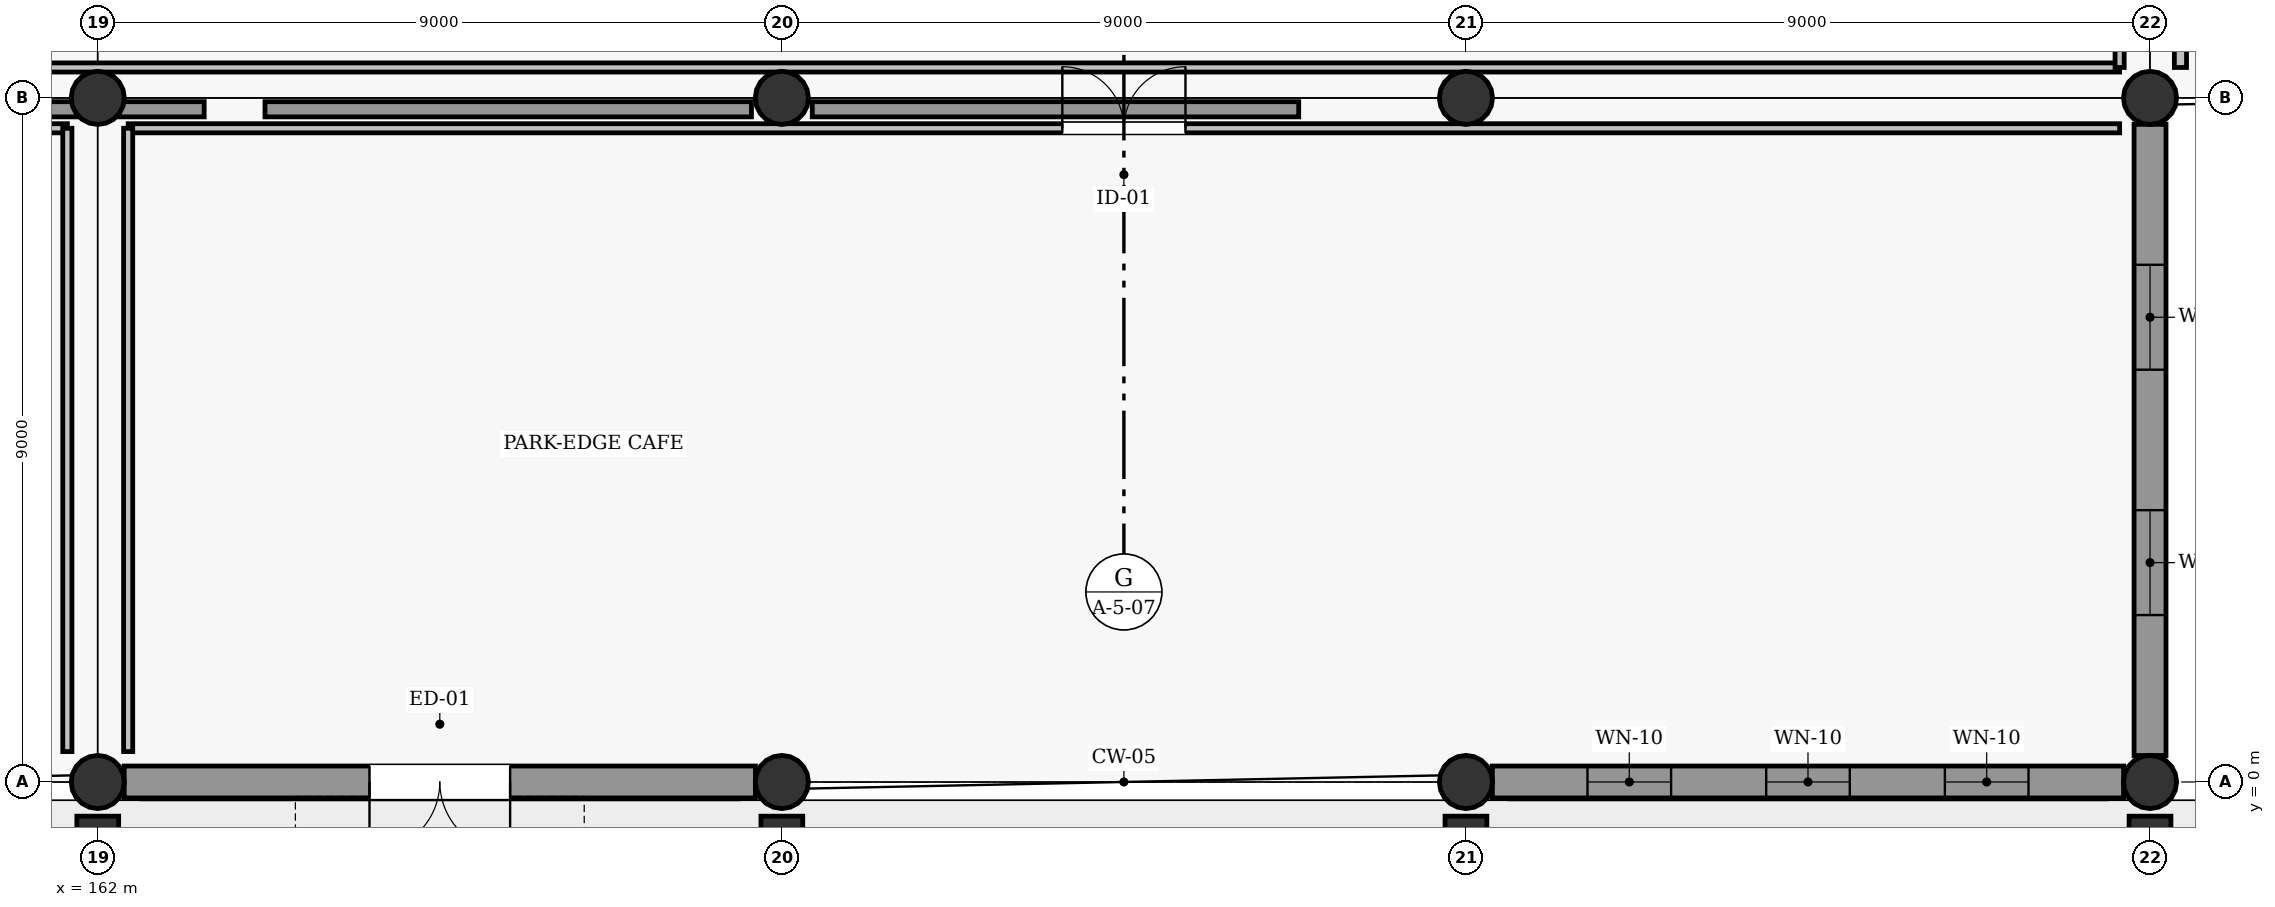
"""IFC4 building model, lengths in metres.
Left out: names, types, materials, properties, quantities, classifications, styles, units other than length and angle.
Written with IfcOpenShell. Run it as: python <this file> out.ifc"""

import sys

from ifc_helpers import new_model, si_unit, direction, frame, frame_2d, origin, origin_2d, place, context, subcontext, project, spatial, rectangle, circle, extrude, element, fill, save


model = new_model("IFC4")
c1 = context("Model", 3, precision=1e-05, world=origin(), true_north=direction((0.0, 1.0)))
c2 = subcontext(c1, "Body", "Model", "MODEL_VIEW")
j1 = project(units=[si_unit("LENGTHUNIT", "METRE"), si_unit("PLANEANGLEUNIT", "RADIAN")], contexts=[c1])
p1 = place(None, origin())
s1 = spatial("IfcSite", under=j1, at=p1, CompositionType="ELEMENT")
p2 = place(p1, origin())
s2 = spatial("IfcBuilding", under=s1, at=p2, CompositionType="ELEMENT")
p3 = place(p2, origin())
s3 = spatial("IfcBuildingStorey", under=s2, at=p3, CompositionType="ELEMENT", Elevation=0.0)
for number, where, z_axis, x_axis in (
    (1, (162.0, 0.0, 0.0), (0.0, 0.0, 1.0), (1.0, 0.0, 0.0)),
    (2, (162.0, 9.0, 0.0), (0.0, 0.0, 1.0), (1.0, 0.0, 0.0)),
    (3, (171.0, 0.0, 0.0), (0.0, 0.0, 1.0), (1.0, 0.0, 0.0)),
    (4, (171.0, 9.0, 0.0), (0.0, 0.0, 1.0), (1.0, 0.0, 0.0)),
    (5, (180.0, 0.0, 0.0), (0.0, 0.0, 1.0), (1.0, 0.0, 0.0)),
    (6, (180.0, 9.0, 0.0), (0.0, 0.0, 1.0), (1.0, 0.0, 0.0)),
    (7, (189.0, 0.0, 0.0), (0.0, 0.0, 1.0), (1.0, 0.0, 0.0)),
    (8, (189.0, 9.0, 0.0), (0.0, 0.0, 1.0), (1.0, 0.0, 0.0)),
):
    element("IfcColumn", number, at=place(p3, frame(where, z_axis=z_axis, x_axis=x_axis)), inside=s3, PredefinedType="COLUMN", context=c2, shape_type="SweptSolid", body=[
        extrude(circle(Radius=0.35, at=origin_2d()), origin(), (0.0, 0.0, 1.0), 4.8),
    ])
for number, where, z_axis, x_axis in (
    (9, (162.0, -0.85, 0.0), (0.0, 0.0, 1.0), (1.0, 0.0, 0.0)),
    (10, (171.0, -0.85, 0.0), (0.0, 0.0, 1.0), (1.0, 0.0, 0.0)),
    (11, (180.0, -0.85, 0.0), (0.0, 0.0, 1.0), (1.0, 0.0, 0.0)),
    (12, (189.0, -0.85, 0.0), (0.0, 0.0, 1.0), (1.0, 0.0, 0.0)),
):
    element("IfcColumn", number, at=place(p3, frame(where, z_axis=z_axis, x_axis=x_axis)), inside=s3, PredefinedType="PILASTER", context=c2, shape_type="SweptSolid", body=[
        extrude(rectangle(XDim=0.55, YDim=0.8, at=origin_2d()), origin(), (0.0, 0.0, 1.0), 4.8),
    ])
p4 = place(p3, frame((162.348, 0.0, 0.0), z_axis=(0.0, 0.0, 1.0), x_axis=(1.0, 0.0, 0.0)))
e13 = element("IfcWall", 13, at=p4, inside=s3, PredefinedType="SOLIDWALL", context=c2, shape_type="SweptSolid", body=[
    extrude(rectangle(XDim=8.304, YDim=0.42, at=frame_2d((4.152, 0.0))), origin(), (0.0, 0.0, 1.0), 3.962),
])
p5 = place(p4, frame((3.227, 0.0, 0.0)))
e14 = element("IfcOpeningElement", 14, at=p5, cuts=e13, PredefinedType="OPENING", context=c2, shape_type="SweptSolid", body=[
    extrude(rectangle(XDim=1.85, YDim=2.35, at=frame_2d((0.925, 1.175))), frame((0.0, 0.22, 0.0), z_axis=(0.0, -1.0, 0.0), x_axis=(1.0, 0.0, 0.0)), (0.0, 0.0, 1.0), 0.44),
])
p6 = place(p3, frame((180.348, 0.0, 0.0), z_axis=(0.0, 0.0, 1.0), x_axis=(1.0, 0.0, 0.0)))
e15 = element("IfcWall", 15, at=p6, inside=s3, PredefinedType="SOLIDWALL", context=c2, shape_type="SweptSolid", body=[
    extrude(rectangle(XDim=8.304, YDim=0.42, at=frame_2d((4.152, 0.0))), origin(), (0.0, 0.0, 1.0), 3.962),
])
p7 = place(p6, frame((1.251, 0.0, 0.85)))
e16 = element("IfcOpeningElement", 16, at=p7, cuts=e15, PredefinedType="OPENING", context=c2, shape_type="SweptSolid", body=[
    extrude(rectangle(XDim=1.1, YDim=2.1, at=frame_2d((0.55, 1.05))), frame((0.0, 0.22, 0.0), z_axis=(0.0, -1.0, 0.0), x_axis=(1.0, 0.0, 0.0)), (0.0, 0.0, 1.0), 0.44),
])
p8 = place(p6, frame((3.602, 0.0, 0.85)))
e17 = element("IfcOpeningElement", 17, at=p8, cuts=e15, PredefinedType="OPENING", context=c2, shape_type="SweptSolid", body=[
    extrude(rectangle(XDim=1.1, YDim=2.1, at=frame_2d((0.55, 1.05))), frame((0.0, 0.22, 0.0), z_axis=(0.0, -1.0, 0.0), x_axis=(1.0, 0.0, 0.0)), (0.0, 0.0, 1.0), 0.44),
])
p9 = place(p6, frame((5.953, 0.0, 0.85)))
e18 = element("IfcOpeningElement", 18, at=p9, cuts=e15, PredefinedType="OPENING", context=c2, shape_type="SweptSolid", body=[
    extrude(rectangle(XDim=1.1, YDim=2.1, at=frame_2d((0.55, 1.05))), frame((0.0, 0.22, 0.0), z_axis=(0.0, -1.0, 0.0), x_axis=(1.0, 0.0, 0.0)), (0.0, 0.0, 1.0), 0.44),
])
p10 = place(p3, frame((189.0, 0.348, 0.0), z_axis=(0.0, 0.0, 1.0), x_axis=(0.0, 1.0, 0.0)))
e19 = element("IfcWall", 19, at=p10, inside=s3, PredefinedType="SOLIDWALL", context=c2, shape_type="SweptSolid", body=[
    extrude(rectangle(XDim=8.304, YDim=0.42, at=frame_2d((4.152, 0.0))), origin(), (0.0, 0.0, 1.0), 4.062),
])
p11 = place(p10, frame((1.848, 0.0, 0.85)))
e20 = element("IfcOpeningElement", 20, at=p11, cuts=e19, PredefinedType="OPENING", context=c2, shape_type="SweptSolid", body=[
    extrude(rectangle(XDim=1.38, YDim=1.52, at=frame_2d((0.69, 0.76))), frame((0.0, 0.22, 0.0), z_axis=(0.0, -1.0, 0.0), x_axis=(1.0, 0.0, 0.0)), (0.0, 0.0, 1.0), 0.44),
])
p12 = place(p10, frame((5.076, 0.0, 0.85)))
e21 = element("IfcOpeningElement", 21, at=p12, cuts=e19, PredefinedType="OPENING", context=c2, shape_type="SweptSolid", body=[
    extrude(rectangle(XDim=1.38, YDim=1.52, at=frame_2d((0.69, 0.76))), frame((0.0, 0.22, 0.0), z_axis=(0.0, -1.0, 0.0), x_axis=(1.0, 0.0, 0.0)), (0.0, 0.0, 1.0), 0.44),
])
p13 = place(p3, frame((157.0, 8.85, 0.0), z_axis=(0.0, 0.0, 1.0), x_axis=(1.0, 0.0, 0.0)))
e22 = element("IfcWall", 22, at=p13, inside=s3, PredefinedType="PARAPET", context=c2, shape_type="SweptSolid", body=[
    extrude(rectangle(XDim=6.4, YDim=0.2, at=frame_2d((3.2, 0.0))), origin(), (0.0, 0.0, 1.0), 0.85),
])
for number, where, z_axis, x_axis in (
    (23, (164.2, 8.85, 0.0), (0.0, 0.0, 1.0), (1.0, 0.0, 0.0)),
    (24, (171.4, 8.85, 0.0), (0.0, 0.0, 1.0), (1.0, 0.0, 0.0)),
):
    element("IfcWall", number, at=place(p3, frame(where, z_axis=z_axis, x_axis=x_axis)), inside=s3, PredefinedType="PARAPET", context=c2, shape_type="SweptSolid", body=[
        extrude(rectangle(XDim=6.4, YDim=0.2, at=frame_2d((3.2, 0.0))), origin(), (0.0, 0.0, 1.0), 0.85),
    ])
p14 = place(p3, frame((135.4, 8.6, 0.0), z_axis=(0.0, 0.0, 1.0), x_axis=(1.0, 0.0, 0.0)))
e25 = element("IfcWall", 25, at=p14, inside=s3, PredefinedType="PARTITIONING", context=c2, shape_type="SweptSolid", body=[
    extrude(rectangle(XDim=26.2, YDim=0.12, at=frame_2d((13.1, 0.0))), origin(), (0.0, 0.0, 1.0), 3.885),
])
p15 = place(p14, frame((12.23, 0.0, 0.0)))
e26 = element("IfcOpeningElement", 26, at=p15, cuts=e25, PredefinedType="OPENING", context=c2, shape_type="SweptSolid", body=[
    extrude(rectangle(XDim=1.74, YDim=2.18, at=frame_2d((0.87, 1.09))), frame((0.0, 0.07, 0.0), z_axis=(0.0, -1.0, 0.0), x_axis=(1.0, 0.0, 0.0)), (0.0, 0.0, 1.0), 0.14),
])
p16 = place(p3, frame((161.6, 0.4, 0.0), z_axis=(0.0, 0.0, 1.0), x_axis=(0.0, 1.0, 0.0)))
e27 = element("IfcWall", 27, at=p16, inside=s3, PredefinedType="PARTITIONING", context=c2, shape_type="SweptSolid", body=[
    extrude(rectangle(XDim=8.2, YDim=0.12, at=frame_2d((4.1, 0.0))), origin(), (0.0, 0.0, 1.0), 4.55),
])
p17 = place(p3, frame((162.4, 8.6, 0.0), z_axis=(0.0, 0.0, 1.0), x_axis=(1.0, 0.0, 0.0)))
e28 = element("IfcWall", 28, at=p17, inside=s3, PredefinedType="PARTITIONING", context=c2, shape_type="SweptSolid", body=[
    extrude(rectangle(XDim=26.2, YDim=0.12, at=frame_2d((13.1, 0.0))), origin(), (0.0, 0.0, 1.0), 3.885),
])
p18 = place(p17, frame((12.29, 0.0, 0.0)))
e29 = element("IfcOpeningElement", 29, at=p18, cuts=e28, PredefinedType="OPENING", context=c2, shape_type="SweptSolid", body=[
    extrude(rectangle(XDim=1.62, YDim=2.14, at=frame_2d((0.81, 1.07))), frame((0.0, 0.07, 0.0), z_axis=(0.0, -1.0, 0.0), x_axis=(1.0, 0.0, 0.0)), (0.0, 0.0, 1.0), 0.14),
])
p19 = place(p3, frame((162.4, 0.4, 0.0), z_axis=(0.0, 0.0, 1.0), x_axis=(0.0, 1.0, 0.0)))
e30 = element("IfcWall", 30, at=p19, inside=s3, PredefinedType="PARTITIONING", context=c2, shape_type="SweptSolid", body=[
    extrude(rectangle(XDim=8.2, YDim=0.12, at=frame_2d((4.1, 0.0))), origin(), (0.0, 0.0, 1.0), 4.55),
])
p20 = place(p3, frame((144.4, 9.4, 0.0), z_axis=(0.0, 0.0, 1.0), x_axis=(1.0, 0.0, 0.0)))
e31 = element("IfcWall", 31, at=p20, inside=s3, PredefinedType="PARTITIONING", context=c2, shape_type="SweptSolid", body=[
    extrude(rectangle(XDim=44.2, YDim=0.12, at=frame_2d((22.1, 0.0))), origin(), (0.0, 0.0, 1.0), 3.885),
])
p21 = place(p3, frame((188.6, 9.4, 0.0), z_axis=(0.0, 0.0, 1.0), x_axis=(0.0, 1.0, 0.0)))
e32 = element("IfcWall", 32, at=p21, inside=s3, PredefinedType="PARTITIONING", context=c2, shape_type="SweptSolid", body=[
    extrude(rectangle(XDim=8.4, YDim=0.12, at=frame_2d((4.2, 0.0))), origin(), (0.0, 0.0, 1.0), 3.785),
])
p22 = place(p3, frame((189.4, 9.4, 0.0), z_axis=(0.0, 0.0, 1.0), x_axis=(0.0, 1.0, 0.0)))
e33 = element("IfcWall", 33, at=p22, inside=s3, PredefinedType="PARTITIONING", context=c2, shape_type="SweptSolid", body=[
    extrude(rectangle(XDim=8.4, YDim=0.16, at=frame_2d((4.2, 0.0))), origin(), (0.0, 0.0, 1.0), 3.785),
])
p23 = place(p5, frame((1.85, 0.0, 0.0), z_axis=(0.0, 0.0, 1.0), x_axis=(-1.0, 0.0, 0.0)))
e34 = element("IfcDoor", 34, at=p23, inside=s3, OperationType="DOUBLE_SWING_LEFT", PredefinedType="DOOR", context=c2, shape_type="SweptSolid", body=[
    extrude(rectangle(XDim=1.85, YDim=2.35, at=frame_2d((0.925, 1.175))), frame((0.0, 0.025, 0.0), z_axis=(0.0, -1.0, 0.0), x_axis=(1.0, 0.0, 0.0)), (0.0, 0.0, 1.0), 0.05),
])
fill(e14, e34)
p24 = place(p7, origin())
e35 = element("IfcWindow", 35, at=p24, inside=s3, PartitioningType="SINGLE_PANEL", PredefinedType="WINDOW", context=c2, shape_type="SweptSolid", body=[
    extrude(rectangle(XDim=1.1, YDim=2.1, at=frame_2d((0.55, 1.05))), frame((0.0, 0.03, 0.0), z_axis=(0.0, -1.0, 0.0), x_axis=(1.0, 0.0, 0.0)), (0.0, 0.0, 1.0), 0.06),
])
fill(e16, e35)
p25 = place(p8, origin())
e36 = element("IfcWindow", 36, at=p25, inside=s3, PartitioningType="SINGLE_PANEL", PredefinedType="WINDOW", context=c2, shape_type="SweptSolid", body=[
    extrude(rectangle(XDim=1.1, YDim=2.1, at=frame_2d((0.55, 1.05))), frame((0.0, 0.03, 0.0), z_axis=(0.0, -1.0, 0.0), x_axis=(1.0, 0.0, 0.0)), (0.0, 0.0, 1.0), 0.06),
])
fill(e17, e36)
p26 = place(p9, origin())
e37 = element("IfcWindow", 37, at=p26, inside=s3, PartitioningType="SINGLE_PANEL", PredefinedType="WINDOW", context=c2, shape_type="SweptSolid", body=[
    extrude(rectangle(XDim=1.1, YDim=2.1, at=frame_2d((0.55, 1.05))), frame((0.0, 0.03, 0.0), z_axis=(0.0, -1.0, 0.0), x_axis=(1.0, 0.0, 0.0)), (0.0, 0.0, 1.0), 0.06),
])
fill(e18, e37)
p27 = place(p11, origin())
e38 = element("IfcWindow", 38, at=p27, inside=s3, PartitioningType="SINGLE_PANEL", PredefinedType="WINDOW", context=c2, shape_type="SweptSolid", body=[
    extrude(rectangle(XDim=1.38, YDim=1.52, at=frame_2d((0.69, 0.76))), frame((0.0, 0.03, 0.0), z_axis=(0.0, -1.0, 0.0), x_axis=(1.0, 0.0, 0.0)), (0.0, 0.0, 1.0), 0.06),
])
fill(e20, e38)
p28 = place(p12, origin())
e39 = element("IfcWindow", 39, at=p28, inside=s3, PartitioningType="SINGLE_PANEL", PredefinedType="WINDOW", context=c2, shape_type="SweptSolid", body=[
    extrude(rectangle(XDim=1.38, YDim=1.52, at=frame_2d((0.69, 0.76))), frame((0.0, 0.03, 0.0), z_axis=(0.0, -1.0, 0.0), x_axis=(1.0, 0.0, 0.0)), (0.0, 0.0, 1.0), 0.06),
])
fill(e21, e39)
p29 = place(p18, origin())
e40 = element("IfcDoor", 40, at=p29, inside=s3, OperationType="DOUBLE_SWING_LEFT", PredefinedType="DOOR", context=c2, shape_type="SweptSolid", body=[
    extrude(rectangle(XDim=1.62, YDim=2.14, at=frame_2d((0.81, 1.07))), frame((0.0, 0.025, 0.0), z_axis=(0.0, -1.0, 0.0), x_axis=(1.0, 0.0, 0.0)), (0.0, 0.0, 1.0), 0.05),
])
fill(e29, e40)
save(model, sys.argv[1])
